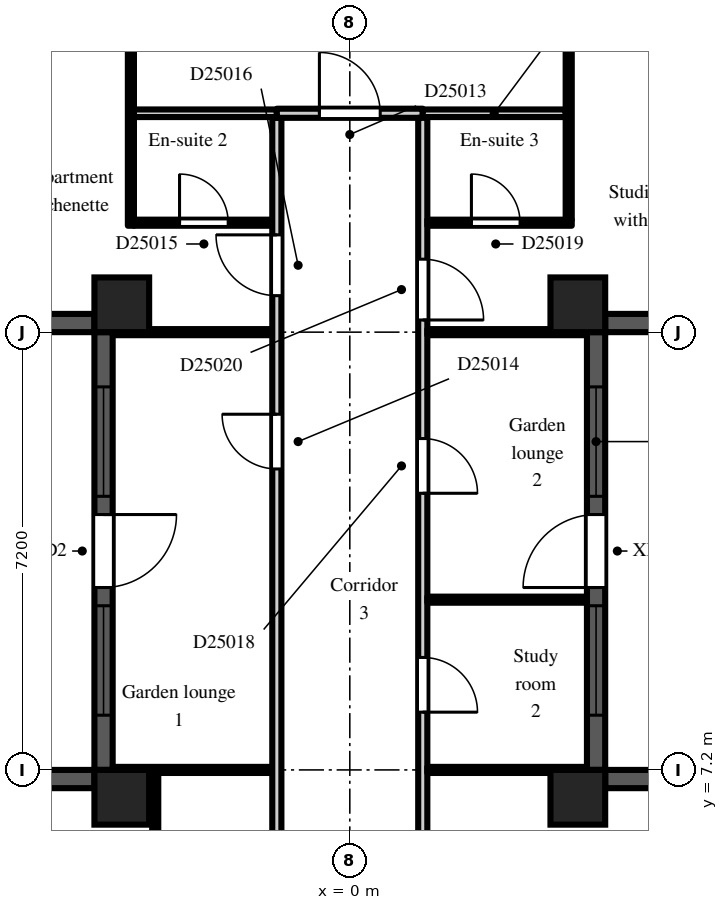
"""IFC4 building model, lengths in metres.
Left out: names, types, materials, properties, quantities, classifications, styles, units other than length and angle.
Written with IfcOpenShell. Run it as: python <this file> out.ifc"""

import sys

from ifc_helpers import new_model, si_unit, direction, frame, frame_2d, origin, origin_2d, place, context, subcontext, project, spatial, rectangle, extrude, element, fill, save


model = new_model("IFC4")
c1 = context("Model", 3, precision=1e-05, world=origin(), true_north=direction((0.0, 1.0)))
c2 = subcontext(c1, "Body", "Model", "MODEL_VIEW")
j1 = project(units=[si_unit("LENGTHUNIT", "METRE"), si_unit("PLANEANGLEUNIT", "RADIAN")], contexts=[c1])
p1 = place(None, origin())
s1 = spatial("IfcSite", under=j1, at=p1, CompositionType="ELEMENT")
p2 = place(p1, origin())
s2 = spatial("IfcBuilding", under=s1, at=p2, CompositionType="ELEMENT")
p3 = place(p2, frame((0.0, 0.0, 170.7)))
s3 = spatial("IfcBuildingStorey", under=s2, at=p3, CompositionType="ELEMENT", Elevation=170.7)
for number, where, z_axis, x_axis in (
    (1, (-3.75, 6.75, 0.0), (0.0, 0.0, 1.0), (1.0, 0.0, 0.0)),
    (2, (-3.75, 14.85, 0.0), (0.0, 0.0, 1.0), (1.0, 0.0, 0.0)),
    (3, (3.75, 6.75, 0.0), (0.0, 0.0, 1.0), (1.0, 0.0, 0.0)),
    (4, (3.75, 14.85, 0.0), (0.0, 0.0, 1.0), (1.0, 0.0, 0.0)),
):
    element("IfcColumn", number, at=place(p3, frame(where, z_axis=z_axis, x_axis=x_axis)), inside=s3, PredefinedType="COLUMN", context=c2, shape_type="SweptSolid", body=[
        extrude(rectangle(XDim=0.9, YDim=0.9, at=origin_2d()), origin(), (0.0, 0.0, 1.0), 3.0),
    ])
p4 = place(p3, frame((7.2, 7.05, 0.0), z_axis=(0.0, 0.0, 1.0), x_axis=(-1.0, 0.0, 0.0)))
e5 = element("IfcWall", 5, at=p4, inside=s3, PredefinedType="SOLIDWALL", context=c2, shape_type="SweptSolid", body=[
    extrude(rectangle(XDim=3.0, YDim=0.3, at=frame_2d((1.5, 0.0))), origin(), (0.0, 0.0, 1.0), 2.2),
])
p5 = place(p3, frame((4.05, 7.2, 0.0), z_axis=(0.0, 0.0, 1.0), x_axis=(0.0, 1.0, 0.0)))
e6 = element("IfcWall", 6, at=p5, inside=s3, PredefinedType="SOLIDWALL", context=c2, shape_type="SweptSolid", body=[
    extrude(rectangle(XDim=7.2, YDim=0.3, at=frame_2d((3.6, 0.0))), origin(), (0.0, 0.0, 1.0), 2.2),
])
p6 = place(p5, frame((3.0, 0.0, 0.0)))
e7 = element("IfcOpeningElement", 7, at=p6, cuts=e6, PredefinedType="OPENING", context=c2, shape_type="SweptSolid", body=[
    extrude(rectangle(XDim=1.2, YDim=2.05, at=frame_2d((0.6, 1.025))), frame((0.0, 0.16, 0.0), z_axis=(0.0, -1.0, 0.0), x_axis=(1.0, 0.0, 0.0)), (0.0, 0.0, 1.0), 0.32),
])
p7 = place(p5, frame((0.9, 0.0, 0.2)))
e8 = element("IfcOpeningElement", 8, at=p7, cuts=e6, PredefinedType="OPENING", context=c2, shape_type="SweptSolid", body=[
    extrude(rectangle(XDim=1.8, YDim=1.85, at=frame_2d((0.9, 0.925))), frame((0.0, 0.16, 0.0), z_axis=(0.0, -1.0, 0.0), x_axis=(1.0, 0.0, 0.0)), (0.0, 0.0, 1.0), 0.32),
])
p8 = place(p5, frame((4.5, 0.0, 0.2)))
e9 = element("IfcOpeningElement", 9, at=p8, cuts=e6, PredefinedType="OPENING", context=c2, shape_type="SweptSolid", body=[
    extrude(rectangle(XDim=1.8, YDim=1.85, at=frame_2d((0.9, 0.925))), frame((0.0, 0.16, 0.0), z_axis=(0.0, -1.0, 0.0), x_axis=(1.0, 0.0, 0.0)), (0.0, 0.0, 1.0), 0.32),
])
for number, where, z_axis, x_axis in (
    (10, (4.2, 14.55, 0.0), (0.0, 0.0, 1.0), (1.0, 0.0, 0.0)),
    (11, (-6.3, 14.55, 0.0), (0.0, 0.0, 1.0), (1.0, 0.0, 0.0)),
):
    element("IfcWall", number, at=place(p3, frame(where, z_axis=z_axis, x_axis=x_axis)), inside=s3, PredefinedType="SOLIDWALL", context=c2, shape_type="SweptSolid", body=[
        extrude(rectangle(XDim=2.1, YDim=0.3, at=frame_2d((1.05, 0.0))), origin(), (0.0, 0.0, 1.0), 2.2),
    ])
p9 = place(p3, frame((-4.05, 14.4, 0.0), z_axis=(0.0, 0.0, 1.0), x_axis=(0.0, -1.0, 0.0)))
e12 = element("IfcWall", 12, at=p9, inside=s3, PredefinedType="SOLIDWALL", context=c2, shape_type="SweptSolid", body=[
    extrude(rectangle(XDim=7.2, YDim=0.3, at=frame_2d((3.6, 0.0))), origin(), (0.0, 0.0, 1.0), 2.2),
])
p10 = place(p9, frame((3.0, 0.0, 0.0)))
e13 = element("IfcOpeningElement", 13, at=p10, cuts=e12, PredefinedType="OPENING", context=c2, shape_type="SweptSolid", body=[
    extrude(rectangle(XDim=1.2, YDim=2.05, at=frame_2d((0.6, 1.025))), frame((0.0, 0.16, 0.0), z_axis=(0.0, -1.0, 0.0), x_axis=(1.0, 0.0, 0.0)), (0.0, 0.0, 1.0), 0.32),
])
p11 = place(p9, frame((0.9, 0.0, 0.2)))
e14 = element("IfcOpeningElement", 14, at=p11, cuts=e12, PredefinedType="OPENING", context=c2, shape_type="SweptSolid", body=[
    extrude(rectangle(XDim=1.8, YDim=1.85, at=frame_2d((0.9, 0.925))), frame((0.0, 0.16, 0.0), z_axis=(0.0, -1.0, 0.0), x_axis=(1.0, 0.0, 0.0)), (0.0, 0.0, 1.0), 0.32),
])
p12 = place(p9, frame((4.5, 0.0, 0.2)))
e15 = element("IfcOpeningElement", 15, at=p12, cuts=e12, PredefinedType="OPENING", context=c2, shape_type="SweptSolid", body=[
    extrude(rectangle(XDim=1.8, YDim=1.85, at=frame_2d((0.9, 0.925))), frame((0.0, 0.16, 0.0), z_axis=(0.0, -1.0, 0.0), x_axis=(1.0, 0.0, 0.0)), (0.0, 0.0, 1.0), 0.32),
])
p13 = place(p3, frame((-4.2, 7.05, 0.0), z_axis=(0.0, 0.0, 1.0), x_axis=(-1.0, 0.0, 0.0)))
e16 = element("IfcWall", 16, at=p13, inside=s3, PredefinedType="SOLIDWALL", context=c2, shape_type="SweptSolid", body=[
    extrude(rectangle(XDim=3.0, YDim=0.3, at=frame_2d((1.5, 0.0))), origin(), (0.0, 0.0, 1.0), 2.2),
])
for number, where, z_axis, x_axis in (
    (17, (-3.9, 7.2, 0.0), (0.0, 0.0, 1.0), (1.0, 0.0, 0.0)),
    (18, (-3.9, 14.4, 0.0), (0.0, 0.0, 1.0), (1.0, 0.0, 0.0)),
):
    element("IfcWall", number, at=place(p3, frame(where, z_axis=z_axis, x_axis=x_axis)), inside=s3, PredefinedType="PARTITIONING", context=c2, shape_type="SweptSolid", body=[
        extrude(rectangle(XDim=2.625, YDim=0.1, at=frame_2d((1.312, 0.0))), origin(), (0.0, 0.0, 1.0), 2.6),
    ])
p14 = place(p3, frame((-3.6, 16.15, 0.0), z_axis=(0.0, 0.0, 1.0), x_axis=(0.0, 1.0, 0.0)))
e19 = element("IfcWall", 19, at=p14, inside=s3, PredefinedType="PARTITIONING", context=c2, shape_type="SweptSolid", body=[
    extrude(rectangle(XDim=3.35, YDim=0.1, at=frame_2d((1.675, 0.0))), origin(), (0.0, 0.0, 1.0), 2.6),
])
p15 = place(p3, frame((-3.55, 16.2, 0.0), z_axis=(0.0, 0.0, 1.0), x_axis=(1.0, 0.0, 0.0)))
e20 = element("IfcWall", 20, at=p15, inside=s3, PredefinedType="PARTITIONING", context=c2, shape_type="SweptSolid", body=[
    extrude(rectangle(XDim=2.275, YDim=0.1, at=frame_2d((1.138, 0.0))), origin(), (0.0, 0.0, 1.0), 2.6),
])
p16 = place(p15, frame((0.75, 0.0, 0.0)))
e21 = element("IfcOpeningElement", 21, at=p16, cuts=e20, PredefinedType="OPENING", context=c2, shape_type="SweptSolid", body=[
    extrude(rectangle(XDim=0.8, YDim=2.1, at=frame_2d((0.4, 1.05))), frame((0.0, 0.06, 0.0), z_axis=(0.0, -1.0, 0.0), x_axis=(1.0, 0.0, 0.0)), (0.0, 0.0, 1.0), 0.12),
])
p17 = place(p3, frame((-3.55, 18.0, 0.0), z_axis=(0.0, 0.0, 1.0), x_axis=(1.0, 0.0, 0.0)))
e22 = element("IfcWall", 22, at=p17, inside=s3, PredefinedType="PARTITIONING", context=c2, shape_type="SweptSolid", body=[
    extrude(rectangle(XDim=2.35, YDim=0.125, at=frame_2d((1.175, 0.0))), origin(), (0.0, 0.0, 1.0), 2.6),
])
p18 = place(p3, frame((-3.2, 1.275, 0.0), z_axis=(0.0, 0.0, 1.0), x_axis=(0.0, 1.0, 0.0)))
e23 = element("IfcWall", 23, at=p18, inside=s3, PredefinedType="PARTITIONING", context=c2, shape_type="SweptSolid", body=[
    extrude(rectangle(XDim=5.875, YDim=0.1, at=frame_2d((2.938, 0.0))), origin(), (0.0, 0.0, 1.0), 2.6),
])
p19 = place(p3, frame((-1.2, 1.275, 0.0), z_axis=(0.0, 0.0, 1.0), x_axis=(0.0, 1.0, 0.0)))
e24 = element("IfcWall", 24, at=p19, inside=s3, PredefinedType="PARTITIONING", context=c2, shape_type="SweptSolid", body=[
    extrude(rectangle(XDim=16.65, YDim=0.15, at=frame_2d((8.325, 0.0))), origin(), (0.0, 0.0, 1.0), 2.6),
])
p20 = place(p19, frame((2.475, 0.0, 0.0)))
e25 = element("IfcOpeningElement", 25, at=p20, cuts=e24, PredefinedType="OPENING", context=c2, shape_type="SweptSolid", body=[
    extrude(rectangle(XDim=0.9, YDim=2.1, at=frame_2d((0.45, 1.05))), frame((0.0, 0.085, 0.0), z_axis=(0.0, -1.0, 0.0), x_axis=(1.0, 0.0, 0.0)), (0.0, 0.0, 1.0), 0.17),
])
p21 = place(p19, frame((10.875, 0.0, 0.0)))
e26 = element("IfcOpeningElement", 26, at=p21, cuts=e24, PredefinedType="OPENING", context=c2, shape_type="SweptSolid", body=[
    extrude(rectangle(XDim=0.9, YDim=2.1, at=frame_2d((0.45, 1.05))), frame((0.0, 0.085, 0.0), z_axis=(0.0, -1.0, 0.0), x_axis=(1.0, 0.0, 0.0)), (0.0, 0.0, 1.0), 0.17),
])
p22 = place(p19, frame((13.725, 0.0, 0.0)))
e27 = element("IfcOpeningElement", 27, at=p22, cuts=e24, PredefinedType="OPENING", context=c2, shape_type="SweptSolid", body=[
    extrude(rectangle(XDim=1.0, YDim=2.1, at=frame_2d((0.5, 1.05))), frame((0.0, 0.085, 0.0), z_axis=(0.0, -1.0, 0.0), x_axis=(1.0, 0.0, 0.0)), (0.0, 0.0, 1.0), 0.17),
])
p23 = place(p3, frame((-1.2, 18.0, 0.0), z_axis=(0.0, 0.0, 1.0), x_axis=(1.0, 0.0, 0.0)))
e28 = element("IfcWall", 28, at=p23, inside=s3, PredefinedType="PARTITIONING", context=c2, shape_type="SweptSolid", body=[
    extrude(rectangle(XDim=2.4, YDim=0.15, at=frame_2d((1.2, 0.0))), origin(), (0.0, 0.0, 1.0), 2.6),
])
p24 = place(p23, frame((0.7, 0.0, 0.0)))
e29 = element("IfcOpeningElement", 29, at=p24, cuts=e28, PredefinedType="OPENING", context=c2, shape_type="SweptSolid", body=[
    extrude(rectangle(XDim=1.0, YDim=2.1, at=frame_2d((0.5, 1.05))), frame((0.0, 0.085, 0.0), z_axis=(0.0, -1.0, 0.0), x_axis=(1.0, 0.0, 0.0)), (0.0, 0.0, 1.0), 0.17),
])
p25 = place(p3, frame((1.2, 1.125, 0.0), z_axis=(0.0, 0.0, 1.0), x_axis=(0.0, 1.0, 0.0)))
e30 = element("IfcWall", 30, at=p25, inside=s3, PredefinedType="PARTITIONING", context=c2, shape_type="SweptSolid", body=[
    extrude(rectangle(XDim=16.8, YDim=0.15, at=frame_2d((8.4, 0.0))), origin(), (0.0, 0.0, 1.0), 2.6),
])
p26 = place(p25, frame((7.025, 0.0, 0.0)))
e31 = element("IfcOpeningElement", 31, at=p26, cuts=e30, PredefinedType="OPENING", context=c2, shape_type="SweptSolid", body=[
    extrude(rectangle(XDim=0.9, YDim=2.1, at=frame_2d((0.45, 1.05))), frame((0.0, 0.085, 0.0), z_axis=(0.0, -1.0, 0.0), x_axis=(1.0, 0.0, 0.0)), (0.0, 0.0, 1.0), 0.17),
])
p27 = place(p25, frame((10.625, 0.0, 0.0)))
e32 = element("IfcOpeningElement", 32, at=p27, cuts=e30, PredefinedType="OPENING", context=c2, shape_type="SweptSolid", body=[
    extrude(rectangle(XDim=0.9, YDim=2.1, at=frame_2d((0.45, 1.05))), frame((0.0, 0.085, 0.0), z_axis=(0.0, -1.0, 0.0), x_axis=(1.0, 0.0, 0.0)), (0.0, 0.0, 1.0), 0.17),
])
p28 = place(p25, frame((13.475, 0.0, 0.0)))
e33 = element("IfcOpeningElement", 33, at=p28, cuts=e30, PredefinedType="OPENING", context=c2, shape_type="SweptSolid", body=[
    extrude(rectangle(XDim=1.0, YDim=2.1, at=frame_2d((0.5, 1.05))), frame((0.0, 0.085, 0.0), z_axis=(0.0, -1.0, 0.0), x_axis=(1.0, 0.0, 0.0)), (0.0, 0.0, 1.0), 0.17),
])
for number, where, z_axis, x_axis in (
    (34, (1.275, 7.2, 0.0), (0.0, 0.0, 1.0), (1.0, 0.0, 0.0)),
    (35, (1.275, 10.0, 0.0), (0.0, 0.0, 1.0), (1.0, 0.0, 0.0)),
    (36, (1.275, 14.4, 0.0), (0.0, 0.0, 1.0), (1.0, 0.0, 0.0)),
):
    element("IfcWall", number, at=place(p3, frame(where, z_axis=z_axis, x_axis=x_axis)), inside=s3, PredefinedType="PARTITIONING", context=c2, shape_type="SweptSolid", body=[
        extrude(rectangle(XDim=2.625, YDim=0.1, at=frame_2d((1.312, 0.0))), origin(), (0.0, 0.0, 1.0), 2.6),
    ])
p29 = place(p3, frame((1.275, 16.2, 0.0), z_axis=(0.0, 0.0, 1.0), x_axis=(1.0, 0.0, 0.0)))
e37 = element("IfcWall", 37, at=p29, inside=s3, PredefinedType="PARTITIONING", context=c2, shape_type="SweptSolid", body=[
    extrude(rectangle(XDim=2.375, YDim=0.1, at=frame_2d((1.188, 0.0))), origin(), (0.0, 0.0, 1.0), 2.6),
])
p30 = place(p29, frame((0.725, 0.0, 0.0)))
e38 = element("IfcOpeningElement", 38, at=p30, cuts=e37, PredefinedType="OPENING", context=c2, shape_type="SweptSolid", body=[
    extrude(rectangle(XDim=0.8, YDim=2.1, at=frame_2d((0.4, 1.05))), frame((0.0, 0.06, 0.0), z_axis=(0.0, -1.0, 0.0), x_axis=(1.0, 0.0, 0.0)), (0.0, 0.0, 1.0), 0.12),
])
p31 = place(p3, frame((1.2, 18.0, 0.0), z_axis=(0.0, 0.0, 1.0), x_axis=(1.0, 0.0, 0.0)))
e39 = element("IfcWall", 39, at=p31, inside=s3, PredefinedType="PARTITIONING", context=c2, shape_type="SweptSolid", body=[
    extrude(rectangle(XDim=2.35, YDim=0.125, at=frame_2d((1.175, 0.0))), origin(), (0.0, 0.0, 1.0), 2.6),
])
p32 = place(p3, frame((3.6, 16.25, 0.0), z_axis=(0.0, 0.0, 1.0), x_axis=(0.0, 1.0, 0.0)))
e40 = element("IfcWall", 40, at=p32, inside=s3, PredefinedType="PARTITIONING", context=c2, shape_type="SweptSolid", body=[
    extrude(rectangle(XDim=3.25, YDim=0.1, at=frame_2d((1.625, 0.0))), origin(), (0.0, 0.0, 1.0), 2.6),
])
p33 = place(p6, origin())
e41 = element("IfcDoor", 41, at=p33, inside=s3, OperationType="SINGLE_SWING_LEFT", PredefinedType="DOOR", context=c2, shape_type="SweptSolid", body=[
    extrude(rectangle(XDim=1.2, YDim=2.05, at=frame_2d((0.6, 1.025))), frame((0.0, 0.025, 0.0), z_axis=(0.0, -1.0, 0.0), x_axis=(1.0, 0.0, 0.0)), (0.0, 0.0, 1.0), 0.05),
])
fill(e7, e41)
p34 = place(p7, origin())
e42 = element("IfcWindow", 42, at=p34, inside=s3, PartitioningType="SINGLE_PANEL", PredefinedType="WINDOW", context=c2, shape_type="SweptSolid", body=[
    extrude(rectangle(XDim=1.8, YDim=1.85, at=frame_2d((0.9, 0.925))), frame((0.0, 0.03, 0.0), z_axis=(0.0, -1.0, 0.0), x_axis=(1.0, 0.0, 0.0)), (0.0, 0.0, 1.0), 0.06),
])
fill(e8, e42)
p35 = place(p8, origin())
e43 = element("IfcWindow", 43, at=p35, inside=s3, PartitioningType="SINGLE_PANEL", PredefinedType="WINDOW", context=c2, shape_type="SweptSolid", body=[
    extrude(rectangle(XDim=1.8, YDim=1.85, at=frame_2d((0.9, 0.925))), frame((0.0, 0.03, 0.0), z_axis=(0.0, -1.0, 0.0), x_axis=(1.0, 0.0, 0.0)), (0.0, 0.0, 1.0), 0.06),
])
fill(e9, e43)
p36 = place(p10, origin())
e44 = element("IfcDoor", 44, at=p36, inside=s3, OperationType="SINGLE_SWING_LEFT", PredefinedType="DOOR", context=c2, shape_type="SweptSolid", body=[
    extrude(rectangle(XDim=1.2, YDim=2.05, at=frame_2d((0.6, 1.025))), frame((0.0, 0.025, 0.0), z_axis=(0.0, -1.0, 0.0), x_axis=(1.0, 0.0, 0.0)), (0.0, 0.0, 1.0), 0.05),
])
fill(e13, e44)
p37 = place(p11, origin())
e45 = element("IfcWindow", 45, at=p37, inside=s3, PartitioningType="SINGLE_PANEL", PredefinedType="WINDOW", context=c2, shape_type="SweptSolid", body=[
    extrude(rectangle(XDim=1.8, YDim=1.85, at=frame_2d((0.9, 0.925))), frame((0.0, 0.03, 0.0), z_axis=(0.0, -1.0, 0.0), x_axis=(1.0, 0.0, 0.0)), (0.0, 0.0, 1.0), 0.06),
])
fill(e14, e45)
p38 = place(p12, origin())
e46 = element("IfcWindow", 46, at=p38, inside=s3, PartitioningType="SINGLE_PANEL", PredefinedType="WINDOW", context=c2, shape_type="SweptSolid", body=[
    extrude(rectangle(XDim=1.8, YDim=1.85, at=frame_2d((0.9, 0.925))), frame((0.0, 0.03, 0.0), z_axis=(0.0, -1.0, 0.0), x_axis=(1.0, 0.0, 0.0)), (0.0, 0.0, 1.0), 0.06),
])
fill(e15, e46)
p39 = place(p24, origin())
e47 = element("IfcDoor", 47, at=p39, inside=s3, OperationType="SINGLE_SWING_LEFT", PredefinedType="DOOR", context=c2, shape_type="SweptSolid", body=[
    extrude(rectangle(XDim=1.0, YDim=2.1, at=frame_2d((0.5, 1.05))), frame((0.0, 0.025, 0.0), z_axis=(0.0, -1.0, 0.0), x_axis=(1.0, 0.0, 0.0)), (0.0, 0.0, 1.0), 0.05),
])
fill(e29, e47)
p40 = place(p21, origin())
e48 = element("IfcDoor", 48, at=p40, inside=s3, OperationType="SINGLE_SWING_RIGHT", PredefinedType="DOOR", context=c2, shape_type="SweptSolid", body=[
    extrude(rectangle(XDim=0.9, YDim=2.1, at=frame_2d((0.45, 1.05))), frame((0.0, 0.025, 0.0), z_axis=(0.0, -1.0, 0.0), x_axis=(1.0, 0.0, 0.0)), (0.0, 0.0, 1.0), 0.05),
])
fill(e26, e48)
p41 = place(p16, origin())
e49 = element("IfcDoor", 49, at=p41, inside=s3, OperationType="SINGLE_SWING_LEFT", PredefinedType="DOOR", context=c2, shape_type="SweptSolid", body=[
    extrude(rectangle(XDim=0.8, YDim=2.1, at=frame_2d((0.4, 1.05))), frame((0.0, 0.025, 0.0), z_axis=(0.0, -1.0, 0.0), x_axis=(1.0, 0.0, 0.0)), (0.0, 0.0, 1.0), 0.05),
])
fill(e21, e49)
p42 = place(p22, origin())
e50 = element("IfcDoor", 50, at=p42, inside=s3, OperationType="SINGLE_SWING_RIGHT", PredefinedType="DOOR", context=c2, shape_type="SweptSolid", body=[
    extrude(rectangle(XDim=1.0, YDim=2.1, at=frame_2d((0.5, 1.05))), frame((0.0, 0.025, 0.0), z_axis=(0.0, -1.0, 0.0), x_axis=(1.0, 0.0, 0.0)), (0.0, 0.0, 1.0), 0.05),
])
fill(e27, e50)
p43 = place(p26, frame((0.9, 0.0, 0.0), z_axis=(0.0, 0.0, 1.0), x_axis=(-1.0, 0.0, 0.0)))
e51 = element("IfcDoor", 51, at=p43, inside=s3, OperationType="SINGLE_SWING_RIGHT", PredefinedType="DOOR", context=c2, shape_type="SweptSolid", body=[
    extrude(rectangle(XDim=0.9, YDim=2.1, at=frame_2d((0.45, 1.05))), frame((0.0, 0.025, 0.0), z_axis=(0.0, -1.0, 0.0), x_axis=(1.0, 0.0, 0.0)), (0.0, 0.0, 1.0), 0.05),
])
fill(e31, e51)
p44 = place(p27, frame((0.9, 0.0, 0.0), z_axis=(0.0, 0.0, 1.0), x_axis=(-1.0, 0.0, 0.0)))
e52 = element("IfcDoor", 52, at=p44, inside=s3, OperationType="SINGLE_SWING_RIGHT", PredefinedType="DOOR", context=c2, shape_type="SweptSolid", body=[
    extrude(rectangle(XDim=0.9, YDim=2.1, at=frame_2d((0.45, 1.05))), frame((0.0, 0.025, 0.0), z_axis=(0.0, -1.0, 0.0), x_axis=(1.0, 0.0, 0.0)), (0.0, 0.0, 1.0), 0.05),
])
fill(e32, e52)
p45 = place(p30, origin())
e53 = element("IfcDoor", 53, at=p45, inside=s3, OperationType="SINGLE_SWING_LEFT", PredefinedType="DOOR", context=c2, shape_type="SweptSolid", body=[
    extrude(rectangle(XDim=0.8, YDim=2.1, at=frame_2d((0.4, 1.05))), frame((0.0, 0.025, 0.0), z_axis=(0.0, -1.0, 0.0), x_axis=(1.0, 0.0, 0.0)), (0.0, 0.0, 1.0), 0.05),
])
fill(e38, e53)
p46 = place(p28, frame((1.0, 0.0, 0.0), z_axis=(0.0, 0.0, 1.0), x_axis=(-1.0, 0.0, 0.0)))
e54 = element("IfcDoor", 54, at=p46, inside=s3, OperationType="SINGLE_SWING_RIGHT", PredefinedType="DOOR", context=c2, shape_type="SweptSolid", body=[
    extrude(rectangle(XDim=1.0, YDim=2.1, at=frame_2d((0.5, 1.05))), frame((0.0, 0.025, 0.0), z_axis=(0.0, -1.0, 0.0), x_axis=(1.0, 0.0, 0.0)), (0.0, 0.0, 1.0), 0.05),
])
fill(e33, e54)
save(model, sys.argv[1])
